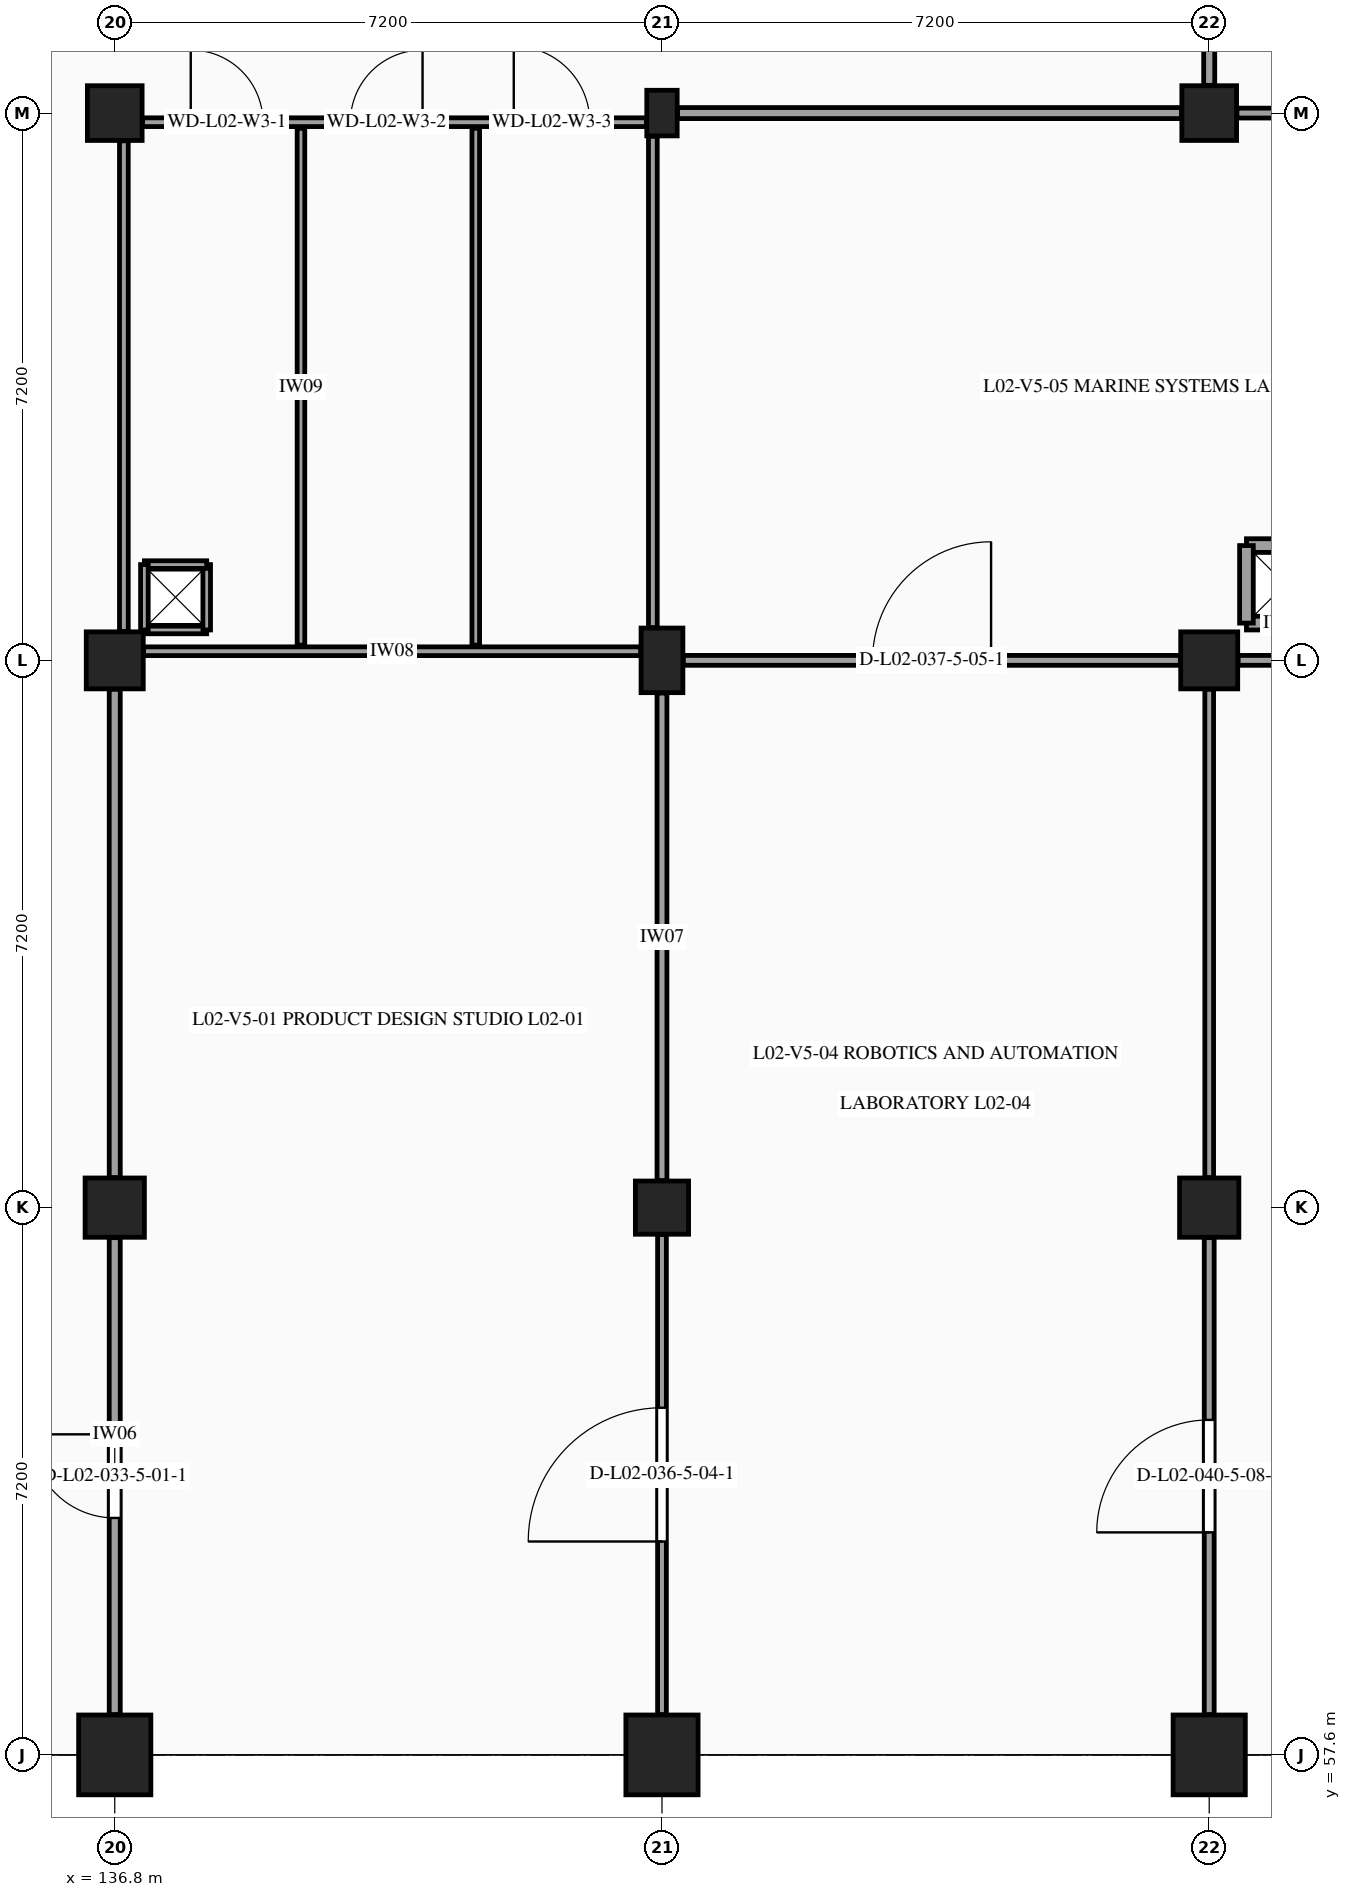
"""IFC4 building model, lengths in metres.
Left out: names, types, materials, properties, quantities, classifications, styles, units other than length and angle.
Written with IfcOpenShell. Run it as: python <this file> out.ifc"""

import sys

from ifc_helpers import new_model, si_unit, direction, frame, frame_2d, origin, origin_2d, place, context, subcontext, project, spatial, rectangle, extrude, element, fill, save


model = new_model("IFC4")
c1 = context("Model", 3, precision=1e-05, world=origin(), true_north=direction((0.0, 1.0)))
c2 = subcontext(c1, "Body", "Model", "MODEL_VIEW")
j1 = project(units=[si_unit("LENGTHUNIT", "METRE"), si_unit("PLANEANGLEUNIT", "RADIAN")], contexts=[c1])
p1 = place(None, origin())
s1 = spatial("IfcSite", under=j1, at=p1, CompositionType="ELEMENT")
p2 = place(p1, origin())
s2 = spatial("IfcBuilding", under=s1, at=p2, CompositionType="ELEMENT")
p3 = place(p2, frame((0.0, 0.0, 9.9)))
s3 = spatial("IfcBuildingStorey", under=s2, at=p3, CompositionType="ELEMENT", Elevation=9.9)
p4 = place(p3, frame((136.8, 57.6, 0.0), z_axis=(0.0, 0.0, 1.0), x_axis=(1.0, 0.0, 0.0)))
e1 = element("IfcColumn", 1, at=p4, inside=s3, PredefinedType="COLUMN", context=c2, shape_type="SweptSolid", body=[
    extrude(rectangle(XDim=0.95, YDim=1.05, at=origin_2d()), origin(), (0.0, 0.0, 1.0), 4.5),
])
p5 = place(p3, frame((136.8, 64.8, 0.0), z_axis=(0.0, 0.0, 1.0), x_axis=(1.0, 0.0, 0.0)))
e2 = element("IfcColumn", 2, at=p5, inside=s3, PredefinedType="COLUMN", context=c2, shape_type="SweptSolid", body=[
    extrude(rectangle(XDim=0.78, YDim=0.78, at=origin_2d()), origin(), (0.0, 0.0, 1.0), 4.5),
])
p6 = place(p3, frame((136.8, 72.0, 0.0), z_axis=(0.0, 0.0, 1.0), x_axis=(1.0, 0.0, 0.0)))
e3 = element("IfcColumn", 3, at=p6, inside=s3, PredefinedType="COLUMN", context=c2, shape_type="SweptSolid", body=[
    extrude(rectangle(XDim=0.75, YDim=0.75, at=origin_2d()), origin(), (0.0, 0.0, 1.0), 4.5),
])
p7 = place(p3, frame((136.8, 79.2, 0.0), z_axis=(0.0, 0.0, 1.0), x_axis=(1.0, 0.0, 0.0)))
e4 = element("IfcColumn", 4, at=p7, inside=s3, PredefinedType="COLUMN", context=c2, shape_type="SweptSolid", body=[
    extrude(rectangle(XDim=0.72, YDim=0.72, at=origin_2d()), origin(), (0.0, 0.0, 1.0), 4.5),
])
p8 = place(p3, frame((144.0, 57.6, 0.0), z_axis=(0.0, 0.0, 1.0), x_axis=(1.0, 0.0, 0.0)))
e5 = element("IfcColumn", 5, at=p8, inside=s3, PredefinedType="COLUMN", context=c2, shape_type="SweptSolid", body=[
    extrude(rectangle(XDim=0.95, YDim=1.05, at=origin_2d()), origin(), (0.0, 0.0, 1.0), 4.5),
])
p9 = place(p3, frame((144.0, 64.8, 0.0), z_axis=(0.0, 0.0, 1.0), x_axis=(1.0, 0.0, 0.0)))
e6 = element("IfcColumn", 6, at=p9, inside=s3, PredefinedType="COLUMN", context=c2, shape_type="SweptSolid", body=[
    extrude(rectangle(XDim=0.7, YDim=0.7, at=origin_2d()), origin(), (0.0, 0.0, 1.0), 4.5),
])
p10 = place(p3, frame((144.0, 72.0, 0.0), z_axis=(0.0, 0.0, 1.0), x_axis=(1.0, 0.0, 0.0)))
e7 = element("IfcColumn", 7, at=p10, inside=s3, PredefinedType="COLUMN", context=c2, shape_type="SweptSolid", body=[
    extrude(rectangle(XDim=0.55, YDim=0.85, at=origin_2d()), origin(), (0.0, 0.0, 1.0), 4.5),
])
p11 = place(p3, frame((144.0, 79.2, 0.0), z_axis=(0.0, 0.0, 1.0), x_axis=(1.0, 0.0, 0.0)))
e8 = element("IfcColumn", 8, at=p11, inside=s3, PredefinedType="PILASTER", context=c2, shape_type="SweptSolid", body=[
    extrude(rectangle(XDim=0.4, YDim=0.6, at=origin_2d()), origin(), (0.0, 0.0, 1.0), 4.5),
])
p12 = place(p3, frame((151.2, 57.6, 0.0), z_axis=(0.0, 0.0, 1.0), x_axis=(1.0, 0.0, 0.0)))
e9 = element("IfcColumn", 9, at=p12, inside=s3, PredefinedType="COLUMN", context=c2, shape_type="SweptSolid", body=[
    extrude(rectangle(XDim=0.95, YDim=1.05, at=origin_2d()), origin(), (0.0, 0.0, 1.0), 4.5),
])
p13 = place(p3, frame((151.2, 64.8, 0.0), z_axis=(0.0, 0.0, 1.0), x_axis=(1.0, 0.0, 0.0)))
e10 = element("IfcColumn", 10, at=p13, inside=s3, PredefinedType="COLUMN", context=c2, shape_type="SweptSolid", body=[
    extrude(rectangle(XDim=0.78, YDim=0.78, at=origin_2d()), origin(), (0.0, 0.0, 1.0), 4.5),
])
p14 = place(p3, frame((151.2, 72.0, 0.0), z_axis=(0.0, 0.0, 1.0), x_axis=(1.0, 0.0, 0.0)))
e11 = element("IfcColumn", 11, at=p14, inside=s3, PredefinedType="COLUMN", context=c2, shape_type="SweptSolid", body=[
    extrude(rectangle(XDim=0.75, YDim=0.75, at=origin_2d()), origin(), (0.0, 0.0, 1.0), 4.5),
])
p15 = place(p3, frame((151.2, 79.2, 0.0), z_axis=(0.0, 0.0, 1.0), x_axis=(1.0, 0.0, 0.0)))
e12 = element("IfcColumn", 12, at=p15, inside=s3, PredefinedType="COLUMN", context=c2, shape_type="SweptSolid", body=[
    extrude(rectangle(XDim=0.72, YDim=0.72, at=origin_2d()), origin(), (0.0, 0.0, 1.0), 4.5),
])
p16 = place(p3, frame((137.18, 72.12, 0.0), z_axis=(0.0, 0.0, 1.0), x_axis=(1.0, 0.0, 0.0)))
e13 = element("IfcWall", 13, at=p16, inside=s3, PredefinedType="PARTITIONING", context=c2, shape_type="SweptSolid", body=[
    extrude(rectangle(XDim=6.54, YDim=0.115, at=frame_2d((3.27, 0.0))), origin(), (0.0, 0.0, 1.0), 3.475),
])
p17 = place(p3, frame((137.165, 79.08, 0.0), z_axis=(0.0, 0.0, 1.0), x_axis=(1.0, 0.0, 0.0)))
e14 = element("IfcWall", 14, at=p17, inside=s3, PredefinedType="PARTITIONING", context=c2, shape_type="SweptSolid", body=[
    extrude(rectangle(XDim=6.63, YDim=0.115, at=frame_2d((3.315, 0.0))), origin(), (0.0, 0.0, 1.0), 3.475),
])
p18 = place(p17, frame((0.635, 0.0, 0.0)))
e15 = element("IfcOpeningElement", 15, at=p18, cuts=e14, PredefinedType="OPENING", context=c2, shape_type="SweptSolid", body=[
    extrude(rectangle(XDim=0.95, YDim=2.1, at=frame_2d((0.475, 1.05))), frame((0.0, 0.067, 0.0), z_axis=(0.0, -1.0, 0.0), x_axis=(1.0, 0.0, 0.0)), (0.0, 0.0, 1.0), 0.135),
])
p19 = place(p17, frame((2.735, 0.0, 0.0)))
e16 = element("IfcOpeningElement", 16, at=p19, cuts=e14, PredefinedType="OPENING", context=c2, shape_type="SweptSolid", body=[
    extrude(rectangle(XDim=0.95, YDim=2.1, at=frame_2d((0.475, 1.05))), frame((0.0, 0.067, 0.0), z_axis=(0.0, -1.0, 0.0), x_axis=(1.0, 0.0, 0.0)), (0.0, 0.0, 1.0), 0.135),
])
p20 = place(p17, frame((4.885, 0.0, 0.0)))
e17 = element("IfcOpeningElement", 17, at=p20, cuts=e14, PredefinedType="OPENING", context=c2, shape_type="SweptSolid", body=[
    extrude(rectangle(XDim=1.0, YDim=2.15, at=frame_2d((0.5, 1.075))), frame((0.0, 0.067, 0.0), z_axis=(0.0, -1.0, 0.0), x_axis=(1.0, 0.0, 0.0)), (0.0, 0.0, 1.0), 0.135),
])
p21 = place(p3, frame((136.92, 72.38, 0.0), z_axis=(0.0, 0.0, 1.0), x_axis=(0.0, 1.0, 0.0)))
e18 = element("IfcWall", 18, at=p21, inside=s3, PredefinedType="PARTITIONING", context=c2, shape_type="SweptSolid", body=[
    extrude(rectangle(XDim=6.455, YDim=0.115, at=frame_2d((3.228, 0.0))), origin(), (0.0, 0.0, 1.0), 3.53),
])
p22 = place(p3, frame((143.88, 72.43, 0.0), z_axis=(0.0, 0.0, 1.0), x_axis=(0.0, 1.0, 0.0)))
e19 = element("IfcWall", 19, at=p22, inside=s3, PredefinedType="PARTITIONING", context=c2, shape_type="SweptSolid", body=[
    extrude(rectangle(XDim=6.465, YDim=0.115, at=frame_2d((3.232, 0.0))), origin(), (0.0, 0.0, 1.0), 3.53),
])
for number, where, z_axis, x_axis in (
    (20, (139.25, 72.2, 0.0), (0.0, 0.0, 1.0), (0.0, 1.0, 0.0)),
    (21, (141.55, 72.2, 0.0), (0.0, 0.0, 1.0), (0.0, 1.0, 0.0)),
):
    element("IfcWall", number, at=place(p3, frame(where, z_axis=z_axis, x_axis=x_axis)), inside=s3, PredefinedType="PARTITIONING", context=c2, shape_type="SweptSolid", body=[
        extrude(rectangle(XDim=6.8, YDim=0.1, at=frame_2d((3.4, 0.0))), origin(), (0.0, 0.0, 1.0), 4.225),
    ])
for number, where, z_axis, x_axis in (
    (22, (151.69, 72.49, 0.0), (0.0, 0.0, 1.0), (1.0, 0.0, 0.0)),
    (23, (152.71, 73.51, 0.0), (0.0, 0.0, 1.0), (-1.0, 0.0, 0.0)),
    (24, (151.69, 73.51, 0.0), (0.0, 0.0, 1.0), (0.0, -1.0, 0.0)),
):
    element("IfcWall", number, at=place(p3, frame(where, z_axis=z_axis, x_axis=x_axis)), inside=s3, PredefinedType="PARTITIONING", context=c2, shape_type="SweptSolid", body=[
        extrude(rectangle(XDim=1.02, YDim=0.18, at=frame_2d((0.51, 0.0))), origin(), (0.0, 0.0, 1.0), 4.225),
    ])
p23 = place(p3, frame((137.19, 72.4, 0.0), z_axis=(0.0, 0.0, 1.0), x_axis=(1.0, 0.0, 0.0)))
e25 = element("IfcWall", 25, at=p23, inside=s3, PredefinedType="PARTITIONING", context=c2, shape_type="SweptSolid", body=[
    extrude(rectangle(XDim=0.82, YDim=0.1, at=frame_2d((0.41, 0.0))), origin(), (0.0, 0.0, 1.0), 4.225),
])
p24 = place(p3, frame((138.01, 72.4, 0.0), z_axis=(0.0, 0.0, 1.0), x_axis=(0.0, 1.0, 0.0)))
e26 = element("IfcWall", 26, at=p24, inside=s3, PredefinedType="PARTITIONING", context=c2, shape_type="SweptSolid", body=[
    extrude(rectangle(XDim=0.86, YDim=0.1, at=frame_2d((0.43, 0.0))), origin(), (0.0, 0.0, 1.0), 4.225),
])
p25 = place(p3, frame((138.01, 73.26, 0.0), z_axis=(0.0, 0.0, 1.0), x_axis=(-1.0, 0.0, 0.0)))
e27 = element("IfcWall", 27, at=p25, inside=s3, PredefinedType="PARTITIONING", context=c2, shape_type="SweptSolid", body=[
    extrude(rectangle(XDim=0.82, YDim=0.1, at=frame_2d((0.41, 0.0))), origin(), (0.0, 0.0, 1.0), 4.225),
])
p26 = place(p3, frame((137.19, 73.26, 0.0), z_axis=(0.0, 0.0, 1.0), x_axis=(0.0, -1.0, 0.0)))
e28 = element("IfcWall", 28, at=p26, inside=s3, PredefinedType="PARTITIONING", context=c2, shape_type="SweptSolid", body=[
    extrude(rectangle(XDim=0.86, YDim=0.1, at=frame_2d((0.43, 0.0))), origin(), (0.0, 0.0, 1.0), 4.225),
])
p27 = place(p3, frame((136.8, 58.13, 0.0), z_axis=(0.0, 0.0, 1.0), x_axis=(0.0, 1.0, 0.0)))
e29 = element("IfcWall", 29, at=p27, inside=s3, PredefinedType="PARTITIONING", context=c2, shape_type="SweptSolid", body=[
    extrude(rectangle(XDim=6.275, YDim=0.145, at=frame_2d((3.138, 0.0))), origin(), (0.0, 0.0, 1.0), 3.525),
])
p28 = place(p27, frame((2.587, 0.0, 0.0)))
e30 = element("IfcOpeningElement", 30, at=p28, cuts=e29, PredefinedType="OPENING", context=c2, shape_type="SweptSolid", body=[
    extrude(rectangle(XDim=1.1, YDim=2.15, at=frame_2d((0.55, 1.075))), frame((0.0, 0.083, 0.0), z_axis=(0.0, -1.0, 0.0), x_axis=(1.0, 0.0, 0.0)), (0.0, 0.0, 1.0), 0.165),
])
p29 = place(p3, frame((136.8, 65.195, 0.0), z_axis=(0.0, 0.0, 1.0), x_axis=(0.0, 1.0, 0.0)))
e31 = element("IfcWall", 31, at=p29, inside=s3, PredefinedType="PARTITIONING", context=c2, shape_type="SweptSolid", body=[
    extrude(rectangle(XDim=6.425, YDim=0.145, at=frame_2d((3.212, 0.0))), origin(), (0.0, 0.0, 1.0), 3.53),
])
p30 = place(p3, frame((144.0, 58.13, 0.0), z_axis=(0.0, 0.0, 1.0), x_axis=(0.0, 1.0, 0.0)))
e32 = element("IfcWall", 32, at=p30, inside=s3, PredefinedType="PARTITIONING", context=c2, shape_type="SweptSolid", body=[
    extrude(rectangle(XDim=6.315, YDim=0.115, at=frame_2d((3.158, 0.0))), origin(), (0.0, 0.0, 1.0), 3.525),
])
p31 = place(p30, frame((2.278, 0.0, 0.0)))
e33 = element("IfcOpeningElement", 33, at=p31, cuts=e32, PredefinedType="OPENING", context=c2, shape_type="SweptSolid", body=[
    extrude(rectangle(XDim=1.76, YDim=2.3, at=frame_2d((0.88, 1.15))), frame((0.0, 0.067, 0.0), z_axis=(0.0, -1.0, 0.0), x_axis=(1.0, 0.0, 0.0)), (0.0, 0.0, 1.0), 0.135),
])
p32 = place(p3, frame((144.0, 65.155, 0.0), z_axis=(0.0, 0.0, 1.0), x_axis=(0.0, 1.0, 0.0)))
e34 = element("IfcWall", 34, at=p32, inside=s3, PredefinedType="PARTITIONING", context=c2, shape_type="SweptSolid", body=[
    extrude(rectangle(XDim=6.415, YDim=0.13, at=frame_2d((3.208, 0.0))), origin(), (0.0, 0.0, 1.0), 3.53),
])
p33 = place(p3, frame((151.2, 58.13, 0.0), z_axis=(0.0, 0.0, 1.0), x_axis=(0.0, 1.0, 0.0)))
e35 = element("IfcWall", 35, at=p33, inside=s3, PredefinedType="PARTITIONING", context=c2, shape_type="SweptSolid", body=[
    extrude(rectangle(XDim=6.275, YDim=0.13, at=frame_2d((3.138, 0.0))), origin(), (0.0, 0.0, 1.0), 3.525),
])
p34 = place(p33, frame((2.397, 0.0, 0.0)))
e36 = element("IfcOpeningElement", 36, at=p34, cuts=e35, PredefinedType="OPENING", context=c2, shape_type="SweptSolid", body=[
    extrude(rectangle(XDim=1.48, YDim=2.28, at=frame_2d((0.74, 1.14))), frame((0.0, 0.075, 0.0), z_axis=(0.0, -1.0, 0.0), x_axis=(1.0, 0.0, 0.0)), (0.0, 0.0, 1.0), 0.15),
])
p35 = place(p3, frame((151.2, 65.195, 0.0), z_axis=(0.0, 0.0, 1.0), x_axis=(0.0, 1.0, 0.0)))
e37 = element("IfcWall", 37, at=p35, inside=s3, PredefinedType="PARTITIONING", context=c2, shape_type="SweptSolid", body=[
    extrude(rectangle(XDim=6.425, YDim=0.115, at=frame_2d((3.212, 0.0))), origin(), (0.0, 0.0, 1.0), 3.53),
])
p36 = place(p3, frame((144.28, 72.0, 0.0), z_axis=(0.0, 0.0, 1.0), x_axis=(1.0, 0.0, 0.0)))
e38 = element("IfcWall", 38, at=p36, inside=s3, PredefinedType="PARTITIONING", context=c2, shape_type="SweptSolid", body=[
    extrude(rectangle(XDim=6.54, YDim=0.13, at=frame_2d((3.27, 0.0))), origin(), (0.0, 0.0, 1.0), 3.485),
])
p37 = place(p36, frame((2.49, 0.0, 0.0)))
e39 = element("IfcOpeningElement", 39, at=p37, cuts=e38, PredefinedType="OPENING", context=c2, shape_type="SweptSolid", body=[
    extrude(rectangle(XDim=1.56, YDim=2.25, at=frame_2d((0.78, 1.125))), frame((0.0, 0.075, 0.0), z_axis=(0.0, -1.0, 0.0), x_axis=(1.0, 0.0, 0.0)), (0.0, 0.0, 1.0), 0.15),
])
p38 = place(p3, frame((144.205, 79.2, 0.0), z_axis=(0.0, 0.0, 1.0), x_axis=(1.0, 0.0, 0.0)))
e40 = element("IfcWall", 40, at=p38, inside=s3, PredefinedType="PARTITIONING", context=c2, shape_type="SweptSolid", body=[
    extrude(rectangle(XDim=6.63, YDim=0.145, at=frame_2d((3.315, 0.0))), origin(), (0.0, 0.0, 1.0), 3.485),
])
p39 = place(p3, frame((151.2, 79.565, 0.0), z_axis=(0.0, 0.0, 1.0), x_axis=(0.0, 1.0, 0.0)))
e41 = element("IfcWall", 41, at=p39, inside=s3, PredefinedType="PARTITIONING", context=c2, shape_type="SweptSolid", body=[
    extrude(rectangle(XDim=6.48, YDim=0.145, at=frame_2d((3.24, 0.0))), origin(), (0.0, 0.0, 1.0), 3.595),
])
p40 = place(p39, frame((2.6, 0.0, 0.0)))
e42 = element("IfcOpeningElement", 42, at=p40, cuts=e41, PredefinedType="OPENING", context=c2, shape_type="SweptSolid", body=[
    extrude(rectangle(XDim=1.28, YDim=2.24, at=frame_2d((0.64, 1.12))), frame((0.0, 0.083, 0.0), z_axis=(0.0, -1.0, 0.0), x_axis=(1.0, 0.0, 0.0)), (0.0, 0.0, 1.0), 0.165),
])
p41 = place(p3, frame((151.58, 72.0, 0.0), z_axis=(0.0, 0.0, 1.0), x_axis=(1.0, 0.0, 0.0)))
e43 = element("IfcWall", 43, at=p41, inside=s3, PredefinedType="PARTITIONING", context=c2, shape_type="SweptSolid", body=[
    extrude(rectangle(XDim=6.54, YDim=0.13, at=frame_2d((3.27, 0.0))), origin(), (0.0, 0.0, 1.0), 3.5),
])
p42 = place(p3, frame((151.565, 79.2, 0.0), z_axis=(0.0, 0.0, 1.0), x_axis=(1.0, 0.0, 0.0)))
e44 = element("IfcWall", 44, at=p42, inside=s3, PredefinedType="PARTITIONING", context=c2, shape_type="SweptSolid", body=[
    extrude(rectangle(XDim=6.63, YDim=0.13, at=frame_2d((3.315, 0.0))), origin(), (0.0, 0.0, 1.0), 3.5),
])
p43 = place(p18, origin())
e45 = element("IfcDoor", 45, at=p43, inside=s3, OperationType="SINGLE_SWING_LEFT", PredefinedType="DOOR", context=c2, shape_type="SweptSolid", body=[
    extrude(rectangle(XDim=0.95, YDim=2.1, at=frame_2d((0.475, 1.05))), frame((0.0, 0.025, 0.0), z_axis=(0.0, -1.0, 0.0), x_axis=(1.0, 0.0, 0.0)), (0.0, 0.0, 1.0), 0.05),
])
fill(e15, e45)
p44 = place(p19, origin())
e46 = element("IfcDoor", 46, at=p44, inside=s3, OperationType="SINGLE_SWING_RIGHT", PredefinedType="DOOR", context=c2, shape_type="SweptSolid", body=[
    extrude(rectangle(XDim=0.95, YDim=2.1, at=frame_2d((0.475, 1.05))), frame((0.0, 0.025, 0.0), z_axis=(0.0, -1.0, 0.0), x_axis=(1.0, 0.0, 0.0)), (0.0, 0.0, 1.0), 0.05),
])
fill(e16, e46)
p45 = place(p20, origin())
e47 = element("IfcDoor", 47, at=p45, inside=s3, OperationType="SINGLE_SWING_LEFT", PredefinedType="DOOR", context=c2, shape_type="SweptSolid", body=[
    extrude(rectangle(XDim=1.0, YDim=2.15, at=frame_2d((0.5, 1.075))), frame((0.0, 0.025, 0.0), z_axis=(0.0, -1.0, 0.0), x_axis=(1.0, 0.0, 0.0)), (0.0, 0.0, 1.0), 0.05),
])
fill(e17, e47)
p46 = place(p28, origin())
e48 = element("IfcDoor", 48, at=p46, inside=s3, OperationType="SINGLE_SWING_RIGHT", PredefinedType="DOOR", context=c2, shape_type="SweptSolid", body=[
    extrude(rectangle(XDim=1.1, YDim=2.15, at=frame_2d((0.55, 1.075))), frame((0.0, 0.025, 0.0), z_axis=(0.0, -1.0, 0.0), x_axis=(1.0, 0.0, 0.0)), (0.0, 0.0, 1.0), 0.05),
])
fill(e30, e48)
p47 = place(p31, origin())
e49 = element("IfcDoor", 49, at=p47, inside=s3, OperationType="SINGLE_SWING_LEFT", PredefinedType="DOOR", context=c2, shape_type="SweptSolid", body=[
    extrude(rectangle(XDim=1.76, YDim=2.3, at=frame_2d((0.88, 1.15))), frame((0.0, 0.025, 0.0), z_axis=(0.0, -1.0, 0.0), x_axis=(1.0, 0.0, 0.0)), (0.0, 0.0, 1.0), 0.05),
])
fill(e33, e49)
p48 = place(p37, origin())
e50 = element("IfcDoor", 50, at=p48, inside=s3, OperationType="SINGLE_SWING_RIGHT", PredefinedType="DOOR", context=c2, shape_type="SweptSolid", body=[
    extrude(rectangle(XDim=1.56, YDim=2.25, at=frame_2d((0.78, 1.125))), frame((0.0, 0.025, 0.0), z_axis=(0.0, -1.0, 0.0), x_axis=(1.0, 0.0, 0.0)), (0.0, 0.0, 1.0), 0.05),
])
fill(e39, e50)
p49 = place(p34, origin())
e51 = element("IfcDoor", 51, at=p49, inside=s3, OperationType="SINGLE_SWING_LEFT", PredefinedType="DOOR", context=c2, shape_type="SweptSolid", body=[
    extrude(rectangle(XDim=1.48, YDim=2.28, at=frame_2d((0.74, 1.14))), frame((0.0, 0.025, 0.0), z_axis=(0.0, -1.0, 0.0), x_axis=(1.0, 0.0, 0.0)), (0.0, 0.0, 1.0), 0.05),
])
fill(e36, e51)
save(model, sys.argv[1])
